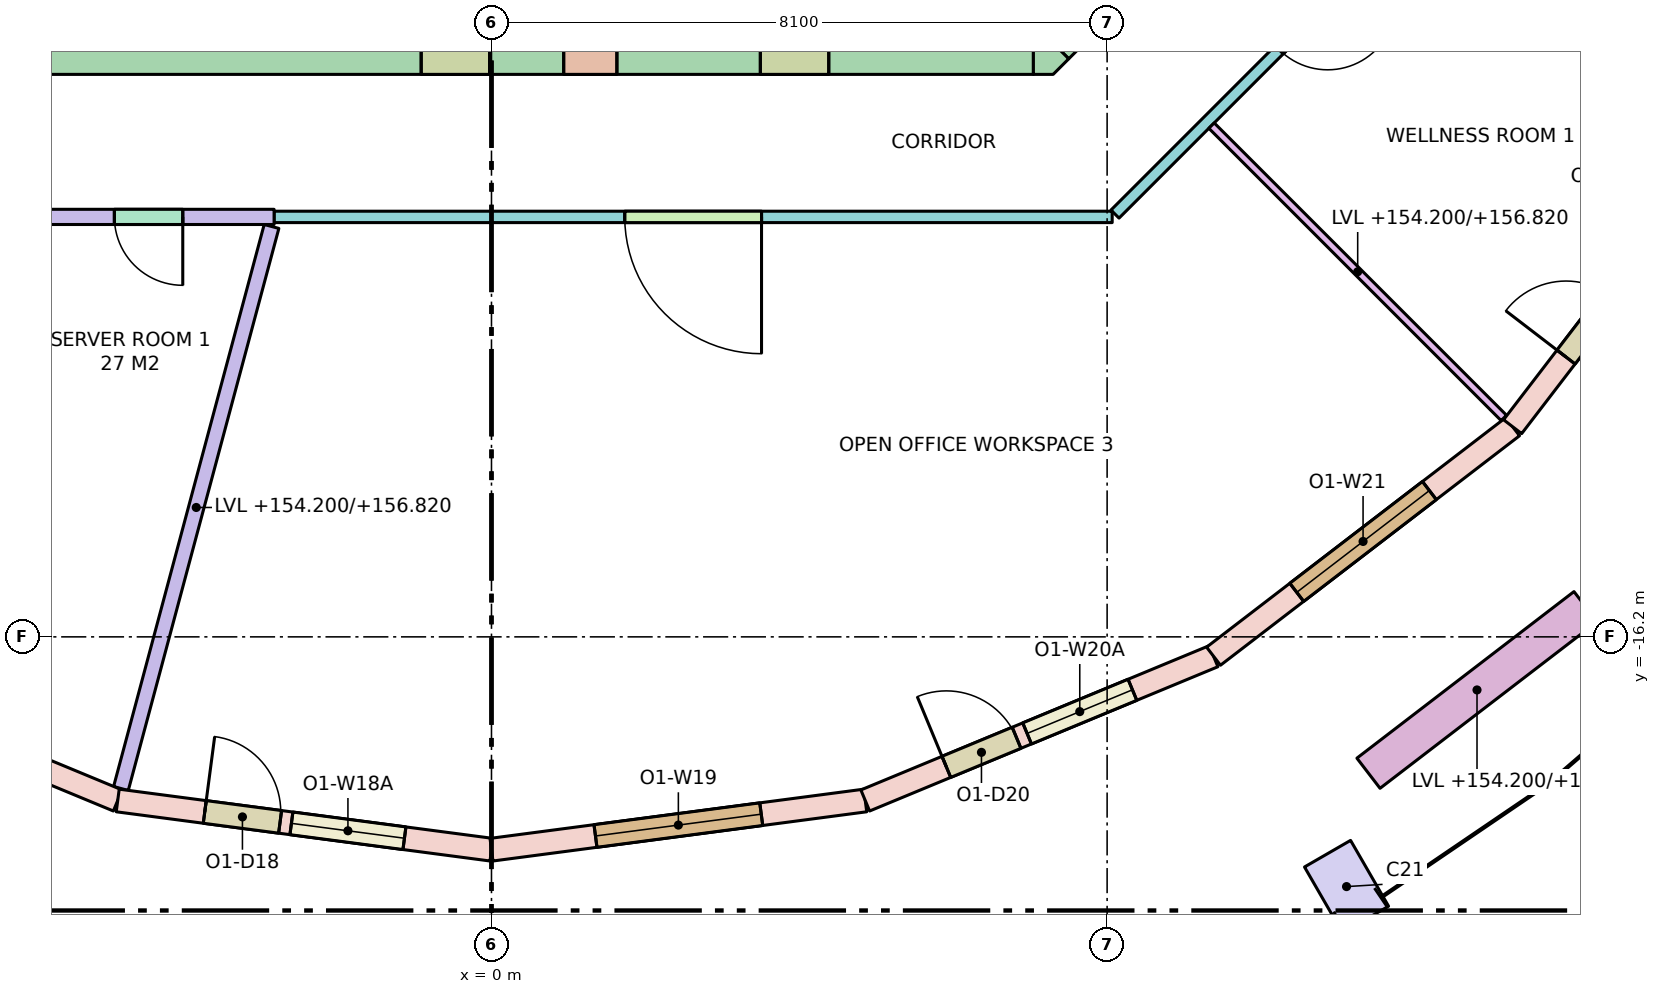
"""IFC4 building model, lengths in metres.
Left out: names, types, materials, properties, quantities, classifications, styles, units other than length and angle.
Written with IfcOpenShell. Run it as: python <this file> out.ifc"""

import sys

from ifc_helpers import new_model, si_unit, direction, frame, frame_2d, origin, origin_2d, place, context, subcontext, project, spatial, polyline, rectangle, outline, extrude, element, fill, save


model = new_model("IFC4")
c1 = context("Model", 3, precision=1e-05, world=origin(), true_north=direction((0.0, 1.0)))
c2 = subcontext(c1, "Body", "Model", "MODEL_VIEW")
j1 = project(units=[si_unit("LENGTHUNIT", "METRE"), si_unit("PLANEANGLEUNIT", "RADIAN")], contexts=[c1])
p1 = place(None, origin())
s1 = spatial("IfcSite", under=j1, at=p1, CompositionType="ELEMENT")
p2 = place(p1, origin())
s2 = spatial("IfcBuilding", under=s1, at=p2, CompositionType="ELEMENT")
p3 = place(p2, frame((0.0, 0.0, 154.2)))
s3 = spatial("IfcBuildingStorey", under=s2, at=p3, CompositionType="ELEMENT", Elevation=154.2)
p4 = place(p3, frame((11.25, -19.486, 0.0), z_axis=(0.0, 0.0, 1.0), x_axis=(0.866025403784, 0.5, 0.0)))
e1 = element("IfcColumn", 1, at=p4, inside=s3, PredefinedType="COLUMN", context=c2, shape_type="SweptSolid", body=[
    extrude(rectangle(XDim=0.7, YDim=1.0, at=origin_2d()), origin(), (0.0, 0.0, 1.0), 3.7),
])
p5 = place(p3, frame((-7.13, -8.45, -0.28), z_axis=(0.0, 0.0, 1.0), x_axis=(1.0, 0.0, 0.0)))
e2 = element("IfcWall", 2, at=p5, inside=s3, PredefinedType="SHEAR", context=c2, shape_type="SweptSolid", body=[
    extrude(rectangle(XDim=14.26, YDim=0.7, at=frame_2d((7.13, 0.0))), origin(), (0.0, 0.0, 1.0), 3.7),
])
p6 = place(p5, frame((8.08, 0.0, 0.28)))
e3 = element("IfcOpeningElement", 3, at=p6, cuts=e2, PredefinedType="OPENING", context=c2, shape_type="SweptSolid", body=[
    extrude(rectangle(XDim=0.7, YDim=2.1, at=frame_2d((0.35, 1.05))), frame((0.0, 0.36, 0.0), z_axis=(0.0, -1.0, 0.0), x_axis=(1.0, 0.0, 0.0)), (0.0, 0.0, 1.0), 0.72),
])
p7 = place(p5, frame((6.205, 0.0, 0.28)))
e4 = element("IfcOpeningElement", 4, at=p7, cuts=e2, PredefinedType="OPENING", context=c2, shape_type="SweptSolid", body=[
    extrude(rectangle(XDim=0.9, YDim=2.1, at=frame_2d((0.45, 1.05))), frame((0.0, 0.36, 0.0), z_axis=(0.0, -1.0, 0.0), x_axis=(1.0, 0.0, 0.0)), (0.0, 0.0, 1.0), 0.72),
])
p8 = place(p5, frame((10.667, 0.0, 0.28)))
e5 = element("IfcOpeningElement", 5, at=p8, cuts=e2, PredefinedType="OPENING", context=c2, shape_type="SweptSolid", body=[
    extrude(rectangle(XDim=0.9, YDim=2.1, at=frame_2d((0.45, 1.05))), frame((0.0, 0.36, 0.0), z_axis=(0.0, -1.0, 0.0), x_axis=(1.0, 0.0, 0.0)), (0.0, 0.0, 1.0), 0.72),
])
p9 = place(p3, frame((10.347, -5.347, -0.28), z_axis=(0.0, 0.0, 1.0), x_axis=(-0.707106781187, -0.707106781187, 0.0)))
e6 = element("IfcWall", 6, at=p9, inside=s3, PredefinedType="SHEAR", context=c2, shape_type="SweptSolid", body=[
    extrude(rectangle(XDim=4.243, YDim=0.7, at=frame_2d((2.121, 0.0))), origin(), (0.0, 0.0, 1.0), 3.7),
])
p10 = place(p9, frame((0.52, 0.0, 0.28)))
e7 = element("IfcOpeningElement", 7, at=p10, cuts=e6, PredefinedType="OPENING", context=c2, shape_type="SweptSolid", body=[
    extrude(rectangle(XDim=0.9, YDim=2.1, at=frame_2d((0.45, 1.05))), frame((0.0, 0.36, 0.0), z_axis=(0.0, -1.0, 0.0), x_axis=(1.0, 0.0, 0.0)), (0.0, 0.0, 1.0), 0.72),
])
p11 = place(p3, frame((0.0, 0.0, -0.28)))
e8 = element("IfcWall", 8, at=p11, inside=s3, PredefinedType="SHEAR", context=c2, shape_type="SweptSolid", body=[
    extrude(outline(polyline([(7.39, -8.8), (7.13, -8.8), (7.13, -8.8), (7.13, -8.13), (7.595, -8.595), (7.595, -8.595), (7.595, -8.595), (7.39, -8.8)])), origin(), (0.0, 0.0, 1.0), 3.7),
])
p12 = place(p3, frame((-9.5, -16.455, 0.0), z_axis=(0.0, 0.0, 1.0), x_axis=(0.923893254961, -0.382650301762, 0.0)))
e9 = element("IfcWall", 9, at=p12, inside=s3, PredefinedType="STANDARD", context=c2, shape_type="SweptSolid", body=[
    extrude(rectangle(XDim=4.96, YDim=0.3, at=frame_2d((2.48, 0.0))), origin(), (0.0, 0.0, 1.0), 3.42),
])
p13 = place(p12, frame((1.38, 0.0, 0.8)))
e10 = element("IfcOpeningElement", 10, at=p13, cuts=e9, PredefinedType="OPENING", context=c2, shape_type="SweptSolid", body=[
    extrude(rectangle(XDim=2.2, YDim=2.4, at=frame_2d((1.1, 1.2))), frame((0.0, 0.16, 0.0), z_axis=(0.0, -1.0, 0.0), x_axis=(1.0, 0.0, 0.0)), (0.0, 0.0, 1.0), 0.32),
])
p14 = place(p3, frame((-4.917, -18.353, 0.0), z_axis=(0.0, 0.0, 1.0), x_axis=(0.991443234469, -0.130538549191, 0.0)))
e11 = element("IfcWall", 11, at=p14, inside=s3, PredefinedType="STANDARD", context=c2, shape_type="SweptSolid", body=[
    extrude(rectangle(XDim=4.96, YDim=0.3, at=frame_2d((2.48, 0.0))), origin(), (0.0, 0.0, 1.0), 3.42),
])
p15 = place(p14, frame((1.155, 0.0, 0.0)))
e12 = element("IfcOpeningElement", 12, at=p15, cuts=e11, PredefinedType="OPENING", context=c2, shape_type="SweptSolid", body=[
    extrude(rectangle(XDim=1.0, YDim=2.4, at=frame_2d((0.5, 1.2))), frame((0.0, 0.16, 0.0), z_axis=(0.0, -1.0, 0.0), x_axis=(1.0, 0.0, 0.0)), (0.0, 0.0, 1.0), 0.32),
])
p16 = place(p14, frame((2.305, 0.0, 0.8)))
e13 = element("IfcOpeningElement", 13, at=p16, cuts=e11, PredefinedType="OPENING", context=c2, shape_type="SweptSolid", body=[
    extrude(rectangle(XDim=1.5, YDim=2.4, at=frame_2d((0.75, 1.2))), frame((0.0, 0.16, 0.0), z_axis=(0.0, -1.0, 0.0), x_axis=(1.0, 0.0, 0.0)), (0.0, 0.0, 1.0), 0.32),
])
p17 = place(p3, frame((0.0, -19.0, 0.0), z_axis=(0.0, 0.0, 1.0), x_axis=(0.991443234469, 0.130538549191, 0.0)))
e14 = element("IfcWall", 14, at=p17, inside=s3, PredefinedType="STANDARD", context=c2, shape_type="SweptSolid", body=[
    extrude(rectangle(XDim=4.96, YDim=0.3, at=frame_2d((2.48, 0.0))), origin(), (0.0, 0.0, 1.0), 3.42),
])
p18 = place(p17, frame((1.38, 0.0, 0.8)))
e15 = element("IfcOpeningElement", 15, at=p18, cuts=e14, PredefinedType="OPENING", context=c2, shape_type="SweptSolid", body=[
    extrude(rectangle(XDim=2.2, YDim=2.4, at=frame_2d((1.1, 1.2))), frame((0.0, 0.16, 0.0), z_axis=(0.0, -1.0, 0.0), x_axis=(1.0, 0.0, 0.0)), (0.0, 0.0, 1.0), 0.32),
])
p19 = place(p3, frame((4.917, -18.353, 0.0), z_axis=(0.0, 0.0, 1.0), x_axis=(0.923893254961, 0.382650301762, 0.0)))
e16 = element("IfcWall", 16, at=p19, inside=s3, PredefinedType="STANDARD", context=c2, shape_type="SweptSolid", body=[
    extrude(rectangle(XDim=4.96, YDim=0.3, at=frame_2d((2.48, 0.0))), origin(), (0.0, 0.0, 1.0), 3.42),
])
p20 = place(p19, frame((1.155, 0.0, 0.0)))
e17 = element("IfcOpeningElement", 17, at=p20, cuts=e16, PredefinedType="OPENING", context=c2, shape_type="SweptSolid", body=[
    extrude(rectangle(XDim=1.0, YDim=2.4, at=frame_2d((0.5, 1.2))), frame((0.0, 0.16, 0.0), z_axis=(0.0, -1.0, 0.0), x_axis=(1.0, 0.0, 0.0)), (0.0, 0.0, 1.0), 0.32),
])
p21 = place(p19, frame((2.305, 0.0, 0.8)))
e18 = element("IfcOpeningElement", 18, at=p21, cuts=e16, PredefinedType="OPENING", context=c2, shape_type="SweptSolid", body=[
    extrude(rectangle(XDim=1.5, YDim=2.4, at=frame_2d((0.75, 1.2))), frame((0.0, 0.16, 0.0), z_axis=(0.0, -1.0, 0.0), x_axis=(1.0, 0.0, 0.0)), (0.0, 0.0, 1.0), 0.32),
])
p22 = place(p3, frame((9.5, -16.455, 0.0), z_axis=(0.0, 0.0, 1.0), x_axis=(0.793348024649, 0.608768356425, 0.0)))
e19 = element("IfcWall", 19, at=p22, inside=s3, PredefinedType="STANDARD", context=c2, shape_type="SweptSolid", body=[
    extrude(rectangle(XDim=4.96, YDim=0.3, at=frame_2d((2.48, 0.0))), origin(), (0.0, 0.0, 1.0), 3.42),
])
p23 = place(p22, frame((1.38, 0.0, 0.8)))
e20 = element("IfcOpeningElement", 20, at=p23, cuts=e19, PredefinedType="OPENING", context=c2, shape_type="SweptSolid", body=[
    extrude(rectangle(XDim=2.2, YDim=2.4, at=frame_2d((1.1, 1.2))), frame((0.0, 0.16, 0.0), z_axis=(0.0, -1.0, 0.0), x_axis=(1.0, 0.0, 0.0)), (0.0, 0.0, 1.0), 0.32),
])
p24 = place(p3, frame((13.435, -13.435, 0.0), z_axis=(0.0, 0.0, 1.0), x_axis=(0.608768356425, 0.793348024649, 0.0)))
e21 = element("IfcWall", 21, at=p24, inside=s3, PredefinedType="STANDARD", context=c2, shape_type="SweptSolid", body=[
    extrude(rectangle(XDim=4.96, YDim=0.3, at=frame_2d((2.48, 0.0))), origin(), (0.0, 0.0, 1.0), 3.42),
])
p25 = place(p24, frame((1.155, 0.0, 0.0)))
e22 = element("IfcOpeningElement", 22, at=p25, cuts=e21, PredefinedType="OPENING", context=c2, shape_type="SweptSolid", body=[
    extrude(rectangle(XDim=1.0, YDim=2.4, at=frame_2d((0.5, 1.2))), frame((0.0, 0.16, 0.0), z_axis=(0.0, -1.0, 0.0), x_axis=(1.0, 0.0, 0.0)), (0.0, 0.0, 1.0), 0.32),
])
p26 = place(p24, frame((2.305, 0.0, 0.8)))
e23 = element("IfcOpeningElement", 23, at=p26, cuts=e21, PredefinedType="OPENING", context=c2, shape_type="SweptSolid", body=[
    extrude(rectangle(XDim=1.5, YDim=2.4, at=frame_2d((0.75, 1.2))), frame((0.0, 0.16, 0.0), z_axis=(0.0, -1.0, 0.0), x_axis=(1.0, 0.0, 0.0)), (0.0, 0.0, 1.0), 0.32),
])
p27 = place(p3, frame((11.539, -17.994, 0.0), z_axis=(0.0, 0.0, 1.0), x_axis=(0.793384730612, 0.608720518162, 0.0)))
e24 = element("IfcWall", 24, at=p27, inside=s3, PredefinedType="PARAPET", context=c2, shape_type="SweptSolid", body=[
    extrude(rectangle(XDim=3.6, YDim=0.5, at=frame_2d((1.8, 0.0))), origin(), (0.0, 0.0, 1.0), 0.9),
])
p28 = place(p3, frame((12.638, -6.204, 0.0), z_axis=(0.0, 0.0, 1.0), x_axis=(-0.707106781187, -0.707106781187, 0.0)))
e25 = element("IfcWall", 25, at=p28, inside=s3, PredefinedType="PARTITIONING", context=c2, shape_type="SweptSolid", body=[
    extrude(rectangle(XDim=6.271, YDim=0.15, at=frame_2d((3.135, 0.0))), origin(), (0.0, 0.0, 1.0), 2.62),
])
p29 = place(p28, frame((2.314, 0.0, 0.0)))
e26 = element("IfcOpeningElement", 26, at=p29, cuts=e25, PredefinedType="OPENING", context=c2, shape_type="SweptSolid", body=[
    extrude(rectangle(XDim=0.9, YDim=2.1, at=frame_2d((0.45, 1.05))), frame((0.0, 0.085, 0.0), z_axis=(0.0, -1.0, 0.0), x_axis=(1.0, 0.0, 0.0)), (0.0, 0.0, 1.0), 0.17),
])
p30 = place(p3, frame((8.167, -10.675, 0.0), z_axis=(0.0, 0.0, 1.0), x_axis=(-1.0, 0.0, 0.0)))
e27 = element("IfcWall", 27, at=p30, inside=s3, PredefinedType="PARTITIONING", context=c2, shape_type="SweptSolid", body=[
    extrude(rectangle(XDim=11.027, YDim=0.15, at=frame_2d((5.513, 0.0))), origin(), (0.0, 0.0, 1.0), 2.62),
])
p31 = place(p30, frame((4.614, 0.0, 0.0)))
e28 = element("IfcOpeningElement", 28, at=p31, cuts=e27, PredefinedType="OPENING", context=c2, shape_type="SweptSolid", body=[
    extrude(rectangle(XDim=1.8, YDim=2.1, at=frame_2d((0.9, 1.05))), frame((0.0, 0.085, 0.0), z_axis=(0.0, -1.0, 0.0), x_axis=(1.0, 0.0, 0.0)), (0.0, 0.0, 1.0), 0.17),
])
p32 = place(p3, frame((-2.86, -10.675, 0.0), z_axis=(0.0, 0.0, 1.0), x_axis=(-1.0, 0.0, 0.0)))
e29 = element("IfcWall", 29, at=p32, inside=s3, PredefinedType="PARTITIONING", context=c2, shape_type="SweptSolid", body=[
    extrude(rectangle(XDim=3.303, YDim=0.2, at=frame_2d((1.651, 0.0))), origin(), (0.0, 0.0, 1.0), 2.62),
])
p33 = place(p32, frame((1.201, 0.0, 0.0)))
e30 = element("IfcOpeningElement", 30, at=p33, cuts=e29, PredefinedType="OPENING", context=c2, shape_type="SweptSolid", body=[
    extrude(rectangle(XDim=0.9, YDim=2.1, at=frame_2d((0.45, 1.05))), frame((0.0, 0.11, 0.0), z_axis=(0.0, -1.0, 0.0), x_axis=(1.0, 0.0, 0.0)), (0.0, 0.0, 1.0), 0.22),
])
p34 = place(p3, frame((-2.894, -10.801, 0.0), z_axis=(0.0, 0.0, 1.0), x_axis=(-0.258807821336, -0.965928833618, 0.0)))
e31 = element("IfcWall", 31, at=p34, inside=s3, PredefinedType="PARTITIONING", context=c2, shape_type="SweptSolid", body=[
    extrude(rectangle(XDim=7.655, YDim=0.2, at=frame_2d((3.828, 0.0))), origin(), (0.0, 0.0, 1.0), 2.62),
])
p35 = place(p3, frame((9.474, -9.474, 0.0), z_axis=(0.0, 0.0, 1.0), x_axis=(0.707106781187, -0.707106781187, 0.0)))
e32 = element("IfcWall", 32, at=p35, inside=s3, PredefinedType="PARTITIONING", context=c2, shape_type="SweptSolid", body=[
    extrude(rectangle(XDim=5.439, YDim=0.1, at=frame_2d((2.719, 0.0))), origin(), (0.0, 0.0, 1.0), 2.62),
])
p36 = place(p3, frame((12.025, -6.943, 0.0), z_axis=(0.0, 0.0, 1.0), x_axis=(0.866025463095, -0.499999897272, 0.0)))
e33 = element("IfcWall", 33, at=p36, inside=s3, PredefinedType="PARTITIONING", context=c2, shape_type="SweptSolid", body=[
    extrude(rectangle(XDim=4.951, YDim=0.1, at=frame_2d((2.476, 0.0))), origin(), (0.0, 0.0, 1.0), 2.62),
])
p37 = place(p15, origin())
e34 = element("IfcDoor", 34, at=p37, inside=s3, OperationType="SINGLE_SWING_LEFT", PredefinedType="DOOR", context=c2, shape_type="SweptSolid", body=[
    extrude(rectangle(XDim=1.0, YDim=2.4, at=frame_2d((0.5, 1.2))), frame((0.0, 0.025, 0.0), z_axis=(0.0, -1.0, 0.0), x_axis=(1.0, 0.0, 0.0)), (0.0, 0.0, 1.0), 0.05),
])
fill(e12, e34)
p38 = place(p16, origin())
e35 = element("IfcWindow", 35, at=p38, inside=s3, PartitioningType="SINGLE_PANEL", PredefinedType="WINDOW", context=c2, shape_type="SweptSolid", body=[
    extrude(rectangle(XDim=1.5, YDim=2.4, at=frame_2d((0.75, 1.2))), frame((0.0, 0.03, 0.0), z_axis=(0.0, -1.0, 0.0), x_axis=(1.0, 0.0, 0.0)), (0.0, 0.0, 1.0), 0.06),
])
fill(e13, e35)
p39 = place(p18, origin())
e36 = element("IfcWindow", 36, at=p39, inside=s3, PartitioningType="SINGLE_PANEL", PredefinedType="WINDOW", context=c2, shape_type="SweptSolid", body=[
    extrude(rectangle(XDim=2.2, YDim=2.4, at=frame_2d((1.1, 1.2))), frame((0.0, 0.03, 0.0), z_axis=(0.0, -1.0, 0.0), x_axis=(1.0, 0.0, 0.0)), (0.0, 0.0, 1.0), 0.06),
])
fill(e15, e36)
p40 = place(p20, origin())
e37 = element("IfcDoor", 37, at=p40, inside=s3, OperationType="SINGLE_SWING_LEFT", PredefinedType="DOOR", context=c2, shape_type="SweptSolid", body=[
    extrude(rectangle(XDim=1.0, YDim=2.4, at=frame_2d((0.5, 1.2))), frame((0.0, 0.025, 0.0), z_axis=(0.0, -1.0, 0.0), x_axis=(1.0, 0.0, 0.0)), (0.0, 0.0, 1.0), 0.05),
])
fill(e17, e37)
p41 = place(p21, origin())
e38 = element("IfcWindow", 38, at=p41, inside=s3, PartitioningType="SINGLE_PANEL", PredefinedType="WINDOW", context=c2, shape_type="SweptSolid", body=[
    extrude(rectangle(XDim=1.5, YDim=2.4, at=frame_2d((0.75, 1.2))), frame((0.0, 0.03, 0.0), z_axis=(0.0, -1.0, 0.0), x_axis=(1.0, 0.0, 0.0)), (0.0, 0.0, 1.0), 0.06),
])
fill(e18, e38)
p42 = place(p23, origin())
e39 = element("IfcWindow", 39, at=p42, inside=s3, PartitioningType="SINGLE_PANEL", PredefinedType="WINDOW", context=c2, shape_type="SweptSolid", body=[
    extrude(rectangle(XDim=2.2, YDim=2.4, at=frame_2d((1.1, 1.2))), frame((0.0, 0.03, 0.0), z_axis=(0.0, -1.0, 0.0), x_axis=(1.0, 0.0, 0.0)), (0.0, 0.0, 1.0), 0.06),
])
fill(e20, e39)
p43 = place(p25, origin())
e40 = element("IfcDoor", 40, at=p43, inside=s3, OperationType="SINGLE_SWING_LEFT", PredefinedType="DOOR", context=c2, shape_type="SweptSolid", body=[
    extrude(rectangle(XDim=1.0, YDim=2.4, at=frame_2d((0.5, 1.2))), frame((0.0, 0.025, 0.0), z_axis=(0.0, -1.0, 0.0), x_axis=(1.0, 0.0, 0.0)), (0.0, 0.0, 1.0), 0.05),
])
fill(e22, e40)
p44 = place(p33, origin())
e41 = element("IfcDoor", 41, at=p44, inside=s3, OperationType="SINGLE_SWING_LEFT", PredefinedType="DOOR", context=c2, shape_type="SweptSolid", body=[
    extrude(rectangle(XDim=0.9, YDim=2.1, at=frame_2d((0.45, 1.05))), frame((0.0, 0.025, 0.0), z_axis=(0.0, -1.0, 0.0), x_axis=(1.0, 0.0, 0.0)), (0.0, 0.0, 1.0), 0.05),
])
fill(e30, e41)
p45 = place(p31, origin())
e42 = element("IfcDoor", 42, at=p45, inside=s3, OperationType="DOUBLE_DOOR_SINGLE_SWING", PredefinedType="DOOR", context=c2, shape_type="SweptSolid", body=[
    extrude(rectangle(XDim=1.8, YDim=2.1, at=frame_2d((0.9, 1.05))), frame((0.0, 0.025, 0.0), z_axis=(0.0, -1.0, 0.0), x_axis=(1.0, 0.0, 0.0)), (0.0, 0.0, 1.0), 0.05),
])
fill(e28, e42)
save(model, sys.argv[1])
